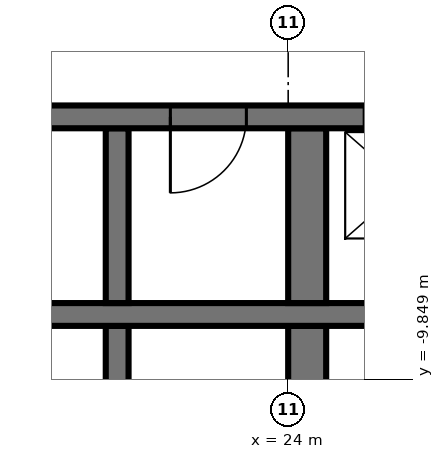
"""IFC4 building model, lengths in metres.
Left out: names, types, materials, properties, quantities, classifications, styles, units other than length and angle.
Written with IfcOpenShell. Run it as: python <this file> out.ifc"""

import sys

from ifc_helpers import new_model, si_unit, direction, frame, frame_2d, origin, place, context, subcontext, project, spatial, rectangle, extrude, element, fill, save


model = new_model("IFC4")
c1 = context("Model", 3, precision=1e-05, world=origin(), true_north=direction((0.0, 1.0)))
c2 = subcontext(c1, "Body", "Model", "MODEL_VIEW")
j1 = project(units=[si_unit("LENGTHUNIT", "METRE"), si_unit("PLANEANGLEUNIT", "RADIAN")], contexts=[c1])
p1 = place(None, origin())
s1 = spatial("IfcSite", under=j1, at=p1, CompositionType="ELEMENT")
p2 = place(p1, origin())
s2 = spatial("IfcBuilding", under=s1, at=p2, CompositionType="ELEMENT")
p3 = place(p2, frame((0.0, 0.0, 85.2)))
s3 = spatial("IfcBuildingStorey", under=s2, at=p3, CompositionType="ELEMENT", Elevation=85.2)
p4 = place(p3, frame((10.35, -6.4, 0.0), z_axis=(0.0, 0.0, 1.0), x_axis=(1.0, 0.0, 0.0)))
e1 = element("IfcWall", 1, at=p4, inside=s3, PredefinedType="SHEAR", context=c2, shape_type="SweptSolid", body=[
    extrude(rectangle(XDim=18.7, YDim=0.3, at=frame_2d((9.35, 0.0))), origin(), (0.0, 0.0, 1.0), 3.6),
])
p5 = place(p4, frame((14.65, 0.0, 0.0)))
e2 = element("IfcOpeningElement", 2, at=p5, cuts=e1, PredefinedType="OPENING", context=c2, shape_type="SweptSolid", body=[
    extrude(rectangle(XDim=1.1, YDim=2.1, at=frame_2d((0.55, 1.05))), frame((0.0, 0.16, 0.0), z_axis=(0.0, -1.0, 0.0), x_axis=(1.0, 0.0, 0.0)), (0.0, 0.0, 1.0), 0.32),
])
p6 = place(p4, frame((17.05, 0.0, 0.0)))
e3 = element("IfcOpeningElement", 3, at=p6, cuts=e1, PredefinedType="OPENING", context=c2, shape_type="SweptSolid", body=[
    extrude(rectangle(XDim=1.1, YDim=2.1, at=frame_2d((0.55, 1.05))), frame((0.0, 0.16, 0.0), z_axis=(0.0, -1.0, 0.0), x_axis=(1.0, 0.0, 0.0)), (0.0, 0.0, 1.0), 0.32),
])
p7 = place(p4, frame((6.8, 0.0, 0.0)))
e4 = element("IfcOpeningElement", 4, at=p7, cuts=e1, PredefinedType="OPENING", context=c2, shape_type="SweptSolid", body=[
    extrude(rectangle(XDim=1.1, YDim=2.1, at=frame_2d((0.55, 1.05))), frame((0.0, 0.16, 0.0), z_axis=(0.0, -1.0, 0.0), x_axis=(1.0, 0.0, 0.0)), (0.0, 0.0, 1.0), 0.32),
])
p8 = place(p4, frame((12.1, 0.0, 0.0)))
e5 = element("IfcOpeningElement", 5, at=p8, cuts=e1, PredefinedType="OPENING", context=c2, shape_type="SweptSolid", body=[
    extrude(rectangle(XDim=1.0, YDim=2.1, at=frame_2d((0.5, 1.05))), frame((0.0, 0.16, 0.0), z_axis=(0.0, -1.0, 0.0), x_axis=(1.0, 0.0, 0.0)), (0.0, 0.0, 1.0), 0.32),
])
p9 = place(p3, frame((10.35, -9.0, 0.0), z_axis=(0.0, 0.0, 1.0), x_axis=(1.0, 0.0, 0.0)))
e6 = element("IfcWall", 6, at=p9, inside=s3, PredefinedType="SHEAR", context=c2, shape_type="SweptSolid", body=[
    extrude(rectangle(XDim=18.7, YDim=0.3, at=frame_2d((9.35, 0.0))), origin(), (0.0, 0.0, 1.0), 3.6),
])
p10 = place(p9, frame((3.8, 0.0, 0.0)))
e7 = element("IfcOpeningElement", 7, at=p10, cuts=e6, PredefinedType="OPENING", context=c2, shape_type="SweptSolid", body=[
    extrude(rectangle(XDim=1.1, YDim=2.1, at=frame_2d((0.55, 1.05))), frame((0.0, 0.16, 0.0), z_axis=(0.0, -1.0, 0.0), x_axis=(1.0, 0.0, 0.0)), (0.0, 0.0, 1.0), 0.32),
])
p11 = place(p3, frame((21.75, -8.85, 0.0), z_axis=(0.0, 0.0, 1.0), x_axis=(0.0, 1.0, 0.0)))
e8 = element("IfcWall", 8, at=p11, inside=s3, PredefinedType="SHEAR", context=c2, shape_type="SweptSolid", body=[
    extrude(rectangle(XDim=2.3, YDim=0.3, at=frame_2d((1.15, 0.0))), origin(), (0.0, 0.0, 1.0), 3.6),
])
p12 = place(p3, frame((21.75, -14.55, 0.0), z_axis=(0.0, 0.0, 1.0), x_axis=(0.0, 1.0, 0.0)))
e9 = element("IfcWall", 9, at=p12, inside=s3, PredefinedType="SHEAR", context=c2, shape_type="SweptSolid", body=[
    extrude(rectangle(XDim=5.4, YDim=0.3, at=frame_2d((2.7, 0.0))), origin(), (0.0, 0.0, 1.0), 3.6),
])
p13 = place(p3, frame((24.25, -8.85, 0.0), z_axis=(0.0, 0.0, 1.0), x_axis=(0.0, 1.0, 0.0)))
e10 = element("IfcWall", 10, at=p13, inside=s3, PredefinedType="SHEAR", context=c2, shape_type="SweptSolid", body=[
    extrude(rectangle(XDim=2.3, YDim=0.5, at=frame_2d((1.15, 0.0))), origin(), (0.0, 0.0, 1.0), 3.6),
])
p14 = place(p3, frame((24.25, -14.55, 0.0), z_axis=(0.0, 0.0, 1.0), x_axis=(0.0, 1.0, 0.0)))
e11 = element("IfcWall", 11, at=p14, inside=s3, PredefinedType="SHEAR", context=c2, shape_type="SweptSolid", body=[
    extrude(rectangle(XDim=5.4, YDim=0.5, at=frame_2d((2.7, 0.0))), origin(), (0.0, 0.0, 1.0), 3.6),
])
p15 = place(p8, frame((0.5, 0.0, 0.0), z_axis=(0.0, 0.0, 1.0), x_axis=(-1.0, 0.0, 0.0)))
e12 = element("IfcDoor", 12, at=p15, inside=s3, OperationType="SINGLE_SWING_LEFT", PredefinedType="DOOR", context=c2, shape_type="SweptSolid", body=[
    extrude(rectangle(XDim=1.0, YDim=2.1, at=frame_2d((0.0, 1.05))), frame((0.0, -0.025, 0.0), z_axis=(0.0, 1.0, 0.0), x_axis=(-1.0, 0.0, 0.0)), (0.0, 0.0, 1.0), 0.05),
])
fill(e5, e12)
save(model, sys.argv[1])
